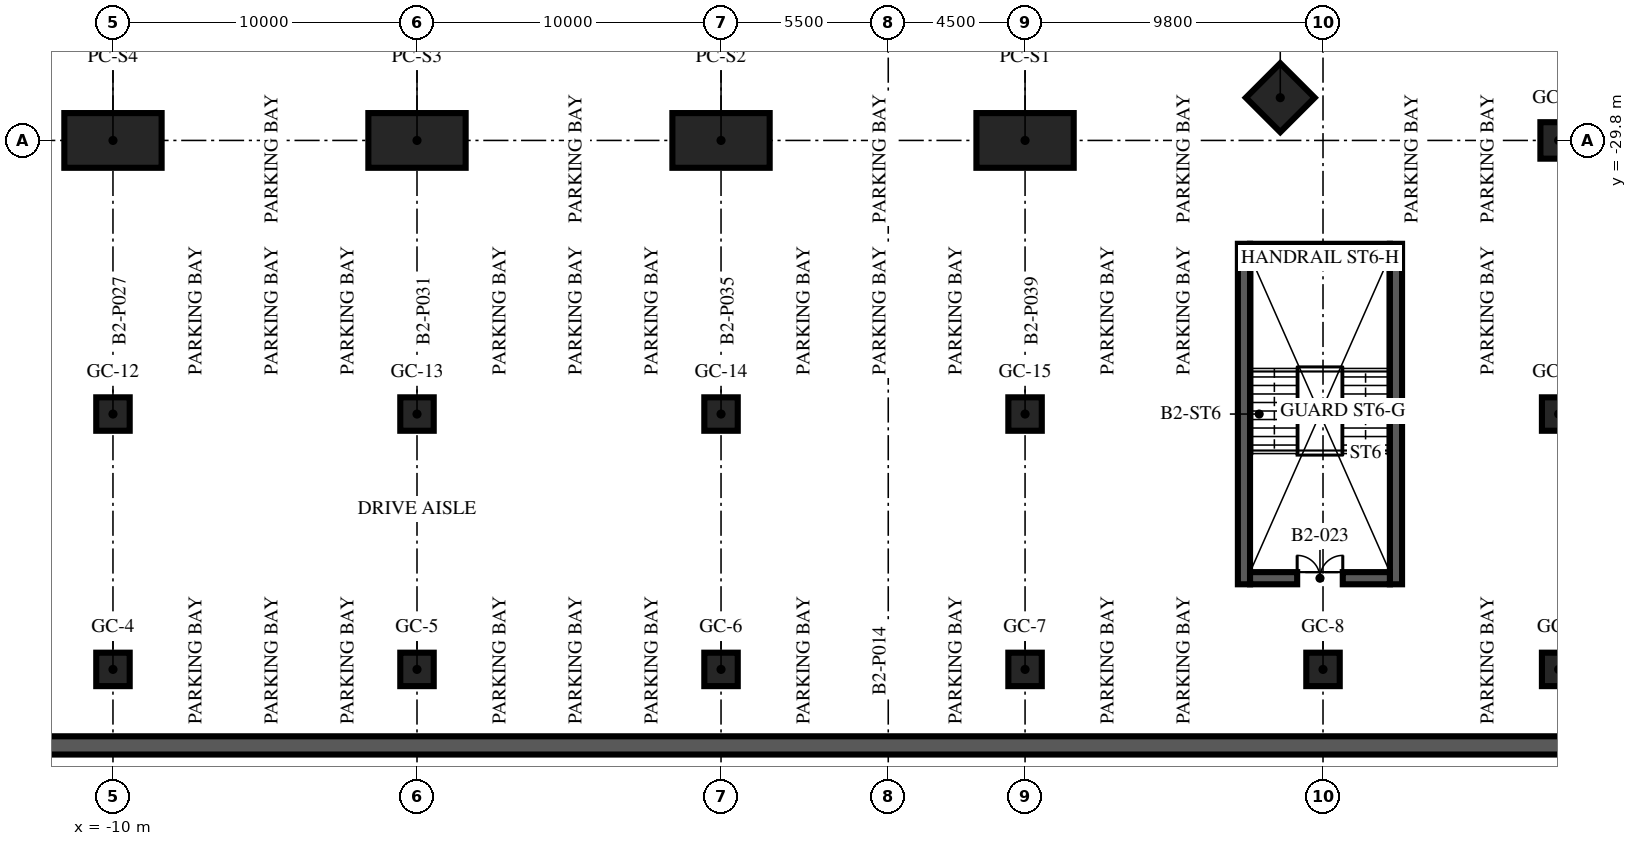
"""IFC4 building model, lengths in metres.
Left out: names, types, materials, properties, quantities, classifications, styles, units other than length and angle.
Written with IfcOpenShell. Run it as: python <this file> out.ifc"""

import sys

from ifc_helpers import new_model, si_unit, direction, frame, frame_2d, origin, origin_2d, place, context, subcontext, project, spatial, rectangle, hollow_rectangle, extrude, element, fill, save


model = new_model("IFC4")
c1 = context("Model", 3, precision=1e-05, world=origin(), true_north=direction((0.0, 1.0)))
c2 = subcontext(c1, "Body", "Model", "MODEL_VIEW")
j1 = project(units=[si_unit("LENGTHUNIT", "METRE"), si_unit("PLANEANGLEUNIT", "RADIAN")], contexts=[c1])
p1 = place(None, origin())
s1 = spatial("IfcSite", under=j1, at=p1, CompositionType="ELEMENT")
p2 = place(p1, origin())
s2 = spatial("IfcBuilding", under=s1, at=p2, CompositionType="ELEMENT")
p3 = place(p2, frame((0.0, 0.0, -9.0)))
s3 = spatial("IfcBuildingStorey", under=s2, at=p3, CompositionType="ELEMENT", Elevation=-9.0)
p4 = place(p3, frame((-46.0, -49.7, -0.3), z_axis=(0.0, 0.0, 1.0), x_axis=(1.0, 0.0, 0.0)))
e1 = element("IfcWall", 1, at=p4, inside=s3, PredefinedType="SOLIDWALL", context=c2, shape_type="SweptSolid", body=[
    extrude(rectangle(XDim=92.0, YDim=0.6, at=frame_2d((46.0, 0.0))), origin(), (0.0, 0.0, 1.0), 3.6),
])
for number, where, z_axis, x_axis in (
    (2, (20.0, -29.8, 0.0), (0.0, 0.0, 1.0), (1.0, 0.0, 0.0)),
    (3, (10.0, -29.8, 0.0), (0.0, 0.0, 1.0), (1.0, 0.0, 0.0)),
    (4, (0.0, -29.8, 0.0), (0.0, 0.0, 1.0), (1.0, 0.0, 0.0)),
    (5, (-10.0, -29.8, 0.0), (0.0, 0.0, 1.0), (1.0, 0.0, 0.0)),
):
    element("IfcColumn", number, at=place(p3, frame(where, z_axis=z_axis, x_axis=x_axis)), inside=s3, PredefinedType="COLUMN", context=c2, shape_type="SweptSolid", body=[
        extrude(hollow_rectangle(XDim=3.2, YDim=1.8, WallThickness=0.2, at=origin_2d()), origin(), (0.0, 0.0, 1.0), 3.6),
    ])
p5 = place(p3, frame((28.394, -28.394, 0.0), z_axis=(0.0, 0.0, 1.0), x_axis=(0.707106781187, 0.707106781187, 0.0)))
e6 = element("IfcColumn", 6, at=p5, inside=s3, PredefinedType="COLUMN", context=c2, shape_type="SweptSolid", body=[
    extrude(hollow_rectangle(XDim=1.6, YDim=1.6, WallThickness=0.1, at=origin_2d()), origin(), (0.0, 0.0, 1.0), 3.6),
])
for number, where, z_axis, x_axis in (
    (7, (-10.0, -47.2, 0.0), (0.0, 0.0, 1.0), (1.0, 0.0, 0.0)),
    (8, (0.0, -47.2, 0.0), (0.0, 0.0, 1.0), (1.0, 0.0, 0.0)),
    (9, (10.0, -47.2, 0.0), (0.0, 0.0, 1.0), (1.0, 0.0, 0.0)),
    (10, (20.0, -47.2, 0.0), (0.0, 0.0, 1.0), (1.0, 0.0, 0.0)),
    (11, (29.8, -47.2, 0.0), (0.0, 0.0, 1.0), (1.0, 0.0, 0.0)),
    (12, (37.55, -47.2, 0.0), (0.0, 0.0, 1.0), (1.0, 0.0, 0.0)),
    (13, (-10.0, -38.8, 0.0), (0.0, 0.0, 1.0), (1.0, 0.0, 0.0)),
    (14, (0.0, -38.8, 0.0), (0.0, 0.0, 1.0), (1.0, 0.0, 0.0)),
    (15, (10.0, -38.8, 0.0), (0.0, 0.0, 1.0), (1.0, 0.0, 0.0)),
    (16, (20.0, -38.8, 0.0), (0.0, 0.0, 1.0), (1.0, 0.0, 0.0)),
    (17, (37.55, -38.8, 0.0), (0.0, 0.0, 1.0), (1.0, 0.0, 0.0)),
):
    element("IfcColumn", number, at=place(p3, frame(where, z_axis=z_axis, x_axis=x_axis)), inside=s3, PredefinedType="COLUMN", context=c2, shape_type="SweptSolid", body=[
        extrude(rectangle(XDim=1.1, YDim=1.1, at=origin_2d()), origin(), (0.0, 0.0, 1.0), 3.6),
    ])
p6 = place(p3, frame((37.55, -29.8, 0.0), z_axis=(0.0, 0.0, 1.0), x_axis=(1.0, 0.0, 0.0)))
e18 = element("IfcColumn", 18, at=p6, inside=s3, PredefinedType="COLUMN", context=c2, shape_type="SweptSolid", body=[
    extrude(rectangle(XDim=1.2, YDim=1.2, at=origin_2d()), origin(), (0.0, 0.0, 1.0), 3.6),
])
for number, where, z_axis, x_axis in (
    (19, (27.2, -44.4, -0.3), (0.0, 0.0, 1.0), (0.0, 1.0, 0.0)),
    (20, (32.2, -44.4, -0.3), (0.0, 0.0, 1.0), (0.0, 1.0, 0.0)),
):
    element("IfcWall", number, at=place(p3, frame(where, z_axis=z_axis, x_axis=x_axis)), inside=s3, PredefinedType="SOLIDWALL", context=c2, shape_type="SweptSolid", body=[
        extrude(rectangle(XDim=11.2, YDim=0.4, at=frame_2d((5.6, 0.0))), origin(), (0.0, 0.0, 1.0), 3.6),
    ])
p7 = place(p3, frame((27.4, -44.2, -0.3), z_axis=(0.0, 0.0, 1.0), x_axis=(1.0, 0.0, 0.0)))
e21 = element("IfcWall", 21, at=p7, inside=s3, PredefinedType="SOLIDWALL", context=c2, shape_type="SweptSolid", body=[
    extrude(rectangle(XDim=4.6, YDim=0.4, at=frame_2d((2.3, 0.0))), origin(), (0.0, 0.0, 1.0), 3.6),
])
p8 = place(p7, frame((1.55, 0.0, 0.3)))
e22 = element("IfcOpeningElement", 22, at=p8, cuts=e21, PredefinedType="OPENING", context=c2, shape_type="SweptSolid", body=[
    extrude(rectangle(XDim=1.5, YDim=2.1, at=frame_2d((0.75, 1.05))), frame((0.0, 0.21, 0.0), z_axis=(0.0, -1.0, 0.0), x_axis=(1.0, 0.0, 0.0)), (0.0, 0.0, 1.0), 0.42),
])
p9 = place(p3, frame((27.4, -33.4, -0.3), z_axis=(0.0, 0.0, 1.0), x_axis=(1.0, 0.0, 0.0)))
e23 = element("IfcWall", 23, at=p9, inside=s3, PredefinedType="SOLIDWALL", context=c2, shape_type="SweptSolid", body=[
    extrude(rectangle(XDim=4.6, YDim=0.4, at=frame_2d((2.3, 0.0))), origin(), (0.0, 0.0, 1.0), 3.6),
])
p10 = place(p8, origin())
e24 = element("IfcDoor", 24, at=p10, inside=s3, OperationType="DOUBLE_DOOR_SINGLE_SWING", PredefinedType="DOOR", context=c2, shape_type="SweptSolid", body=[
    extrude(rectangle(XDim=1.5, YDim=2.1, at=frame_2d((0.75, 1.05))), frame((0.0, 0.025, 0.0), z_axis=(0.0, -1.0, 0.0), x_axis=(1.0, 0.0, 0.0)), (0.0, 0.0, 1.0), 0.05),
])
fill(e22, e24)
save(model, sys.argv[1])
